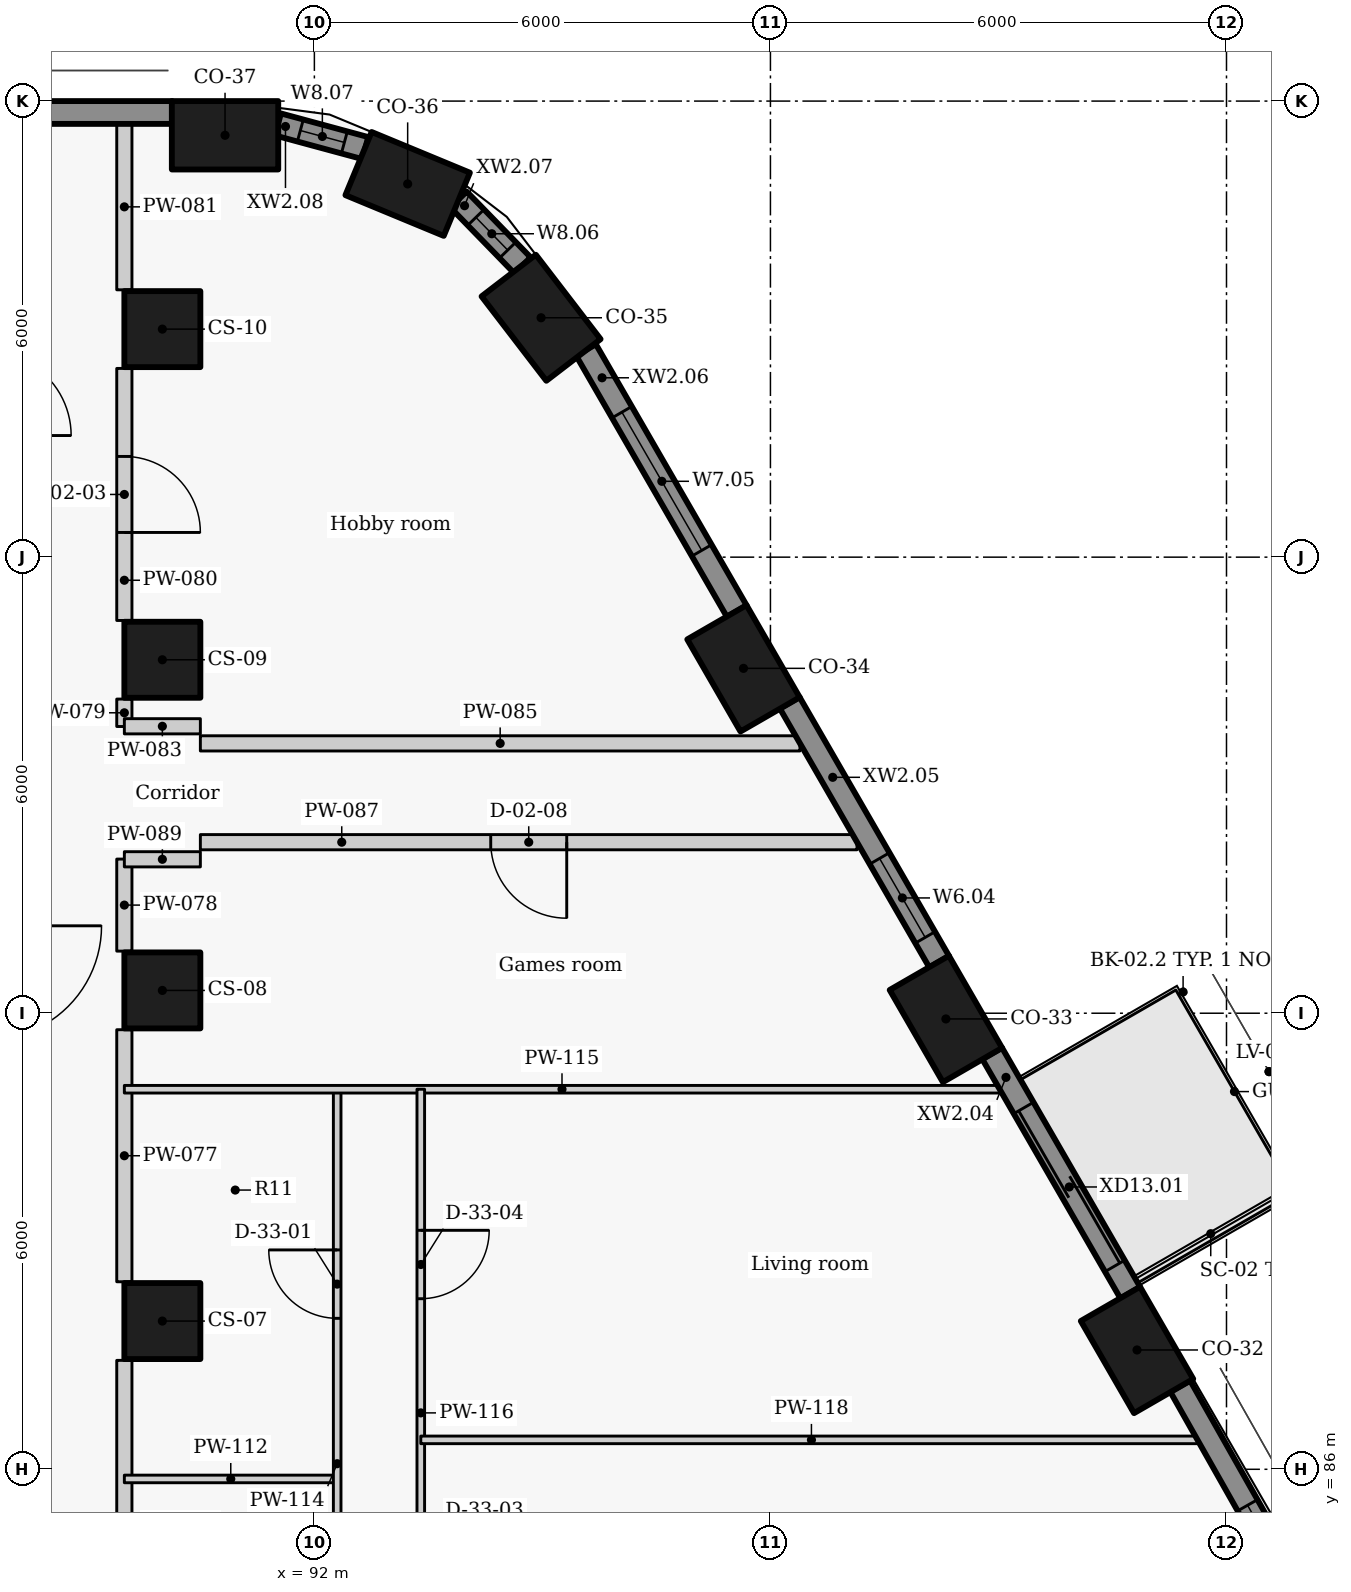
"""IFC4 building model, lengths in metres.
Left out: names, types, materials, properties, quantities, classifications, styles, units other than length and angle.
Written with IfcOpenShell. Run it as: python <this file> out.ifc"""

import sys

from ifc_helpers import new_model, si_unit, direction, frame, frame_2d, origin, origin_2d, place, context, subcontext, project, spatial, rectangle, extrude, element, fill, save


model = new_model("IFC4")
c1 = context("Model", 3, precision=1e-05, world=origin(), true_north=direction((0.0, 1.0)))
c2 = subcontext(c1, "Body", "Model", "MODEL_VIEW")
j1 = project(units=[si_unit("LENGTHUNIT", "METRE"), si_unit("PLANEANGLEUNIT", "RADIAN")], contexts=[c1])
p1 = place(None, origin())
s1 = spatial("IfcSite", under=j1, at=p1, CompositionType="ELEMENT")
p2 = place(p1, origin())
s2 = spatial("IfcBuilding", under=s1, at=p2, CompositionType="ELEMENT")
p3 = place(p2, frame((0.0, 0.0, 114.0)))
s3 = spatial("IfcBuildingStorey", under=s2, at=p3, CompositionType="ELEMENT", Elevation=114.0)
for number, where, z_axis, x_axis in (
    (1, (102.823, 87.57, 0.0), (0.0, 0.0, 1.0), (-0.5, 0.866, 0.0)),
    (2, (100.308, 91.925, 0.0), (0.0, 0.0, 1.0), (-0.5, 0.866, 0.0)),
    (3, (97.646, 96.537, 0.0), (0.0, 0.0, 1.0), (-0.5, 0.866, 0.0)),
    (4, (94.982, 101.149, 0.0), (0.0, 0.0, 1.0), (-0.609, 0.793, 0.0)),
    (5, (93.227, 102.91, 0.0), (0.0, 0.0, 1.0), (-0.924, 0.383, 0.0)),
    (6, (90.825, 103.55, 0.0), (0.0, 0.0, 1.0), (-1.0, 0.0, 0.0)),
):
    element("IfcColumn", number, at=place(p3, frame(where, z_axis=z_axis, x_axis=x_axis)), inside=s3, PredefinedType="COLUMN", context=c2, shape_type="SweptSolid", body=[
        extrude(rectangle(XDim=1.4, YDim=0.9, at=origin_2d()), origin(), (0.0, 0.0, 1.0), 3.3),
    ])
for number, where, z_axis, x_axis in (
    (7, (90.0, 87.95, 0.0), (0.0, 0.0, 1.0), (0.0, 1.0, 0.0)),
    (8, (90.0, 92.3, 0.0), (0.0, 0.0, 1.0), (0.0, 1.0, 0.0)),
    (9, (90.0, 96.65, 0.0), (0.0, 0.0, 1.0), (0.0, 1.0, 0.0)),
    (10, (90.0, 101.0, 0.0), (0.0, 0.0, 1.0), (0.0, 1.0, 0.0)),
):
    element("IfcColumn", number, at=place(p3, frame(where, z_axis=z_axis, x_axis=x_axis)), inside=s3, PredefinedType="COLUMN", context=c2, shape_type="SweptSolid", body=[
        extrude(rectangle(XDim=1.0, YDim=1.0, at=origin_2d()), origin(), (0.0, 0.0, 1.0), 3.3),
    ])
p4 = place(p3, frame((106.186, 82.153, 0.0), z_axis=(0.0, 0.0, 1.0), x_axis=(-0.492456858874, 0.870336855561, 0.0)))
e11 = element("IfcWall", 11, at=p4, inside=s3, PredefinedType="SOLIDWALL", context=c2, shape_type="SweptSolid", body=[
    extrude(rectangle(XDim=5.677, YDim=0.3, at=frame_2d((2.838, 0.0))), origin(), (0.0, 0.0, 1.0), 2.425),
])
p5 = place(p4, frame((2.376, 0.0, 0.9)))
e12 = element("IfcOpeningElement", 12, at=p5, cuts=e11, PredefinedType="OPENING", context=c2, shape_type="SweptSolid", body=[
    extrude(rectangle(XDim=1.5, YDim=1.1, at=frame_2d((0.75, 0.55))), frame((0.0, 0.16, 0.0), z_axis=(0.0, -1.0, 0.0), x_axis=(1.0, 0.0, 0.0)), (0.0, 0.0, 1.0), 0.32),
])
p6 = place(p3, frame((102.735, 88.323, 0.0), z_axis=(0.0, 0.0, 1.0), x_axis=(-0.500009139881, 0.866020126807, 0.0)))
e13 = element("IfcWall", 13, at=p6, inside=s3, PredefinedType="SOLIDWALL", context=c2, shape_type="SweptSolid", body=[
    extrude(rectangle(XDim=3.637, YDim=0.3, at=frame_2d((1.818, 0.0))), origin(), (0.0, 0.0, 1.0), 2.425),
])
p7 = place(p6, frame((0.407, 0.0, 0.0)))
e14 = element("IfcOpeningElement", 14, at=p7, cuts=e13, PredefinedType="OPENING", context=c2, shape_type="SweptSolid", body=[
    extrude(rectangle(XDim=2.4, YDim=2.0, at=frame_2d((1.2, 1.0))), frame((0.0, 0.16, 0.0), z_axis=(0.0, -1.0, 0.0), x_axis=(1.0, 0.0, 0.0)), (0.0, 0.0, 1.0), 0.32),
])
p8 = place(p3, frame((100.22, 92.677, 0.0), z_axis=(0.0, 0.0, 1.0), x_axis=(-0.499957037901, 0.866050206543, 0.0)))
e15 = element("IfcWall", 15, at=p8, inside=s3, PredefinedType="SOLIDWALL", context=c2, shape_type="SweptSolid", body=[
    extrude(rectangle(XDim=3.934, YDim=0.3, at=frame_2d((1.967, 0.0))), origin(), (0.0, 0.0, 1.0), 2.425),
])
p9 = place(p8, frame((0.369, 0.0, 0.9)))
e16 = element("IfcOpeningElement", 16, at=p9, cuts=e15, PredefinedType="OPENING", context=c2, shape_type="SweptSolid", body=[
    extrude(rectangle(XDim=1.2, YDim=1.1, at=frame_2d((0.6, 0.55))), frame((0.0, 0.16, 0.0), z_axis=(0.0, -1.0, 0.0), x_axis=(1.0, 0.0, 0.0)), (0.0, 0.0, 1.0), 0.32),
])
p10 = place(p3, frame((97.557, 97.29, 0.0), z_axis=(0.0, 0.0, 1.0), x_axis=(-0.500043828347, 0.866000097998, 0.0)))
e17 = element("IfcWall", 17, at=p10, inside=s3, PredefinedType="SOLIDWALL", context=c2, shape_type="SweptSolid", body=[
    extrude(rectangle(XDim=3.968, YDim=0.3, at=frame_2d((1.984, 0.0))), origin(), (0.0, 0.0, 1.0), 2.425),
])
p11 = place(p10, frame((0.922, 0.0, 0.9)))
e18 = element("IfcOpeningElement", 18, at=p11, cuts=e17, PredefinedType="OPENING", context=c2, shape_type="SweptSolid", body=[
    extrude(rectangle(XDim=2.1, YDim=1.1, at=frame_2d((1.05, 0.55))), frame((0.0, 0.16, 0.0), z_axis=(0.0, -1.0, 0.0), x_axis=(1.0, 0.0, 0.0)), (0.0, 0.0, 1.0), 0.32),
])
p12 = place(p3, frame((94.738, 101.839, 0.0), z_axis=(0.0, 0.0, 1.0), x_axis=(-0.697032216592, 0.717039809936, 0.0)))
e19 = element("IfcWall", 19, at=p12, inside=s3, PredefinedType="SOLIDWALL", context=c2, shape_type="SweptSolid", body=[
    extrude(rectangle(XDim=1.208, YDim=0.3, at=frame_2d((0.604, 0.0))), origin(), (0.0, 0.0, 1.0), 2.425),
])
p13 = place(p12, frame((0.279, 0.0, 0.9)))
e20 = element("IfcOpeningElement", 20, at=p13, cuts=e19, PredefinedType="OPENING", context=c2, shape_type="SweptSolid", body=[
    extrude(rectangle(XDim=0.6, YDim=1.1, at=frame_2d((0.3, 0.55))), frame((0.0, 0.16, 0.0), z_axis=(0.0, -1.0, 0.0), x_axis=(1.0, 0.0, 0.0)), (0.0, 0.0, 1.0), 0.32),
])
p14 = place(p3, frame((92.669, 103.382, 0.0), z_axis=(0.0, 0.0, 1.0), x_axis=(-0.965278131029, 0.261224290136, 0.0)))
e21 = element("IfcWall", 21, at=p14, inside=s3, PredefinedType="SOLIDWALL", context=c2, shape_type="SweptSolid", body=[
    extrude(rectangle(XDim=1.19, YDim=0.3, at=frame_2d((0.595, 0.0))), origin(), (0.0, 0.0, 1.0), 2.425),
])
p15 = place(p14, frame((0.285, 0.0, 0.9)))
e22 = element("IfcOpeningElement", 22, at=p15, cuts=e21, PredefinedType="OPENING", context=c2, shape_type="SweptSolid", body=[
    extrude(rectangle(XDim=0.6, YDim=1.1, at=frame_2d((0.3, 0.55))), frame((0.0, 0.16, 0.0), z_axis=(0.0, -1.0, 0.0), x_axis=(1.0, 0.0, 0.0)), (0.0, 0.0, 1.0), 0.32),
])
p16 = place(p3, frame((90.129, 103.85, 0.0), z_axis=(0.0, 0.0, 1.0), x_axis=(-1.0, 0.0, 0.0)))
e23 = element("IfcWall", 23, at=p16, inside=s3, PredefinedType="SOLIDWALL", context=c2, shape_type="SweptSolid", body=[
    extrude(rectangle(XDim=20.291, YDim=0.3, at=frame_2d((10.146, 0.0))), origin(), (0.0, 0.0, 1.0), 2.425),
])
p17 = place(p3, frame((89.5, 83.167, 0.0), z_axis=(0.0, 0.0, 1.0), x_axis=(0.0, 1.0, 0.0)))
e24 = element("IfcWall", 24, at=p17, inside=s3, PredefinedType="PARTITIONING", context=c2, shape_type="SweptSolid", body=[
    extrude(rectangle(XDim=4.266, YDim=0.2, at=frame_2d((2.133, 0.0))), origin(), (0.0, 0.0, 1.0), 3.025),
])
p18 = place(p3, frame((89.5, 88.467, 0.0), z_axis=(0.0, 0.0, 1.0), x_axis=(0.0, 1.0, 0.0)))
e25 = element("IfcWall", 25, at=p18, inside=s3, PredefinedType="PARTITIONING", context=c2, shape_type="SweptSolid", body=[
    extrude(rectangle(XDim=3.316, YDim=0.2, at=frame_2d((1.658, 0.0))), origin(), (0.0, 0.0, 1.0), 3.025),
])
p19 = place(p3, frame((89.5, 92.817, 0.0), z_axis=(0.0, 0.0, 1.0), x_axis=(0.0, 1.0, 0.0)))
e26 = element("IfcWall", 26, at=p19, inside=s3, PredefinedType="PARTITIONING", context=c2, shape_type="SweptSolid", body=[
    extrude(rectangle(XDim=1.211, YDim=0.2, at=frame_2d((0.605, 0.0))), origin(), (0.0, 0.0, 1.0), 3.025),
])
p20 = place(p3, frame((89.5, 95.772, 0.0), z_axis=(0.0, 0.0, 1.0), x_axis=(0.0, 1.0, 0.0)))
e27 = element("IfcWall", 27, at=p20, inside=s3, PredefinedType="PARTITIONING", context=c2, shape_type="SweptSolid", body=[
    extrude(rectangle(XDim=0.361, YDim=0.2, at=frame_2d((0.181, 0.0))), origin(), (0.0, 0.0, 1.0), 3.025),
])
p21 = place(p3, frame((89.5, 100.483, 0.0), z_axis=(0.0, 0.0, 1.0), x_axis=(0.0, -1.0, 0.0)))
e28 = element("IfcWall", 28, at=p21, inside=s3, PredefinedType="PARTITIONING", context=c2, shape_type="SweptSolid", body=[
    extrude(rectangle(XDim=3.316, YDim=0.2, at=frame_2d((1.658, 0.0))), origin(), (0.0, 0.0, 1.0), 3.025),
])
p22 = place(p21, frame((1.158, 0.0, 0.0)))
e29 = element("IfcOpeningElement", 29, at=p22, cuts=e28, PredefinedType="OPENING", context=c2, shape_type="SweptSolid", body=[
    extrude(rectangle(XDim=1.0, YDim=2.1, at=frame_2d((0.5, 1.05))), frame((0.0, 0.11, 0.0), z_axis=(0.0, -1.0, 0.0), x_axis=(1.0, 0.0, 0.0)), (0.0, 0.0, 1.0), 0.22),
])
p23 = place(p3, frame((89.5, 101.517, 0.0), z_axis=(0.0, 0.0, 1.0), x_axis=(0.0, 1.0, 0.0)))
e30 = element("IfcWall", 30, at=p23, inside=s3, PredefinedType="PARTITIONING", context=c2, shape_type="SweptSolid", body=[
    extrude(rectangle(XDim=2.183, YDim=0.2, at=frame_2d((1.091, 0.0))), origin(), (0.0, 0.0, 1.0), 3.025),
])
p24 = place(p3, frame((89.5, 95.775, 0.0), z_axis=(0.0, 0.0, 1.0), x_axis=(1.0, 0.0, 0.0)))
e31 = element("IfcWall", 31, at=p24, inside=s3, PredefinedType="PARTITIONING", context=c2, shape_type="SweptSolid", body=[
    extrude(rectangle(XDim=1.0, YDim=0.2, at=frame_2d((0.5, 0.0))), origin(), (0.0, 0.0, 1.0), 2.505),
])
p25 = place(p3, frame((90.5, 95.55, 0.0), z_axis=(0.0, 0.0, 1.0), x_axis=(1.0, 0.0, 0.0)))
e32 = element("IfcWall", 32, at=p25, inside=s3, PredefinedType="PARTITIONING", context=c2, shape_type="SweptSolid", body=[
    extrude(rectangle(XDim=7.889, YDim=0.2, at=frame_2d((3.944, 0.0))), origin(), (0.0, 0.0, 1.0), 2.405),
])
p26 = place(p3, frame((99.139, 94.25, 0.0), z_axis=(0.0, 0.0, 1.0), x_axis=(-1.0, 0.0, 0.0)))
e33 = element("IfcWall", 33, at=p26, inside=s3, PredefinedType="PARTITIONING", context=c2, shape_type="SweptSolid", body=[
    extrude(rectangle(XDim=8.639, YDim=0.2, at=frame_2d((4.32, 0.0))), origin(), (0.0, 0.0, 1.0), 2.405),
])
p27 = place(p26, frame((3.819, 0.0, 0.0)))
e34 = element("IfcOpeningElement", 34, at=p27, cuts=e33, PredefinedType="OPENING", context=c2, shape_type="SweptSolid", body=[
    extrude(rectangle(XDim=1.0, YDim=2.1, at=frame_2d((0.5, 1.05))), frame((0.0, 0.11, 0.0), z_axis=(0.0, -1.0, 0.0), x_axis=(1.0, 0.0, 0.0)), (0.0, 0.0, 1.0), 0.22),
])
p28 = place(p3, frame((89.5, 94.025, 0.0), z_axis=(0.0, 0.0, 1.0), x_axis=(1.0, 0.0, 0.0)))
e35 = element("IfcWall", 35, at=p28, inside=s3, PredefinedType="PARTITIONING", context=c2, shape_type="SweptSolid", body=[
    extrude(rectangle(XDim=1.0, YDim=0.2, at=frame_2d((0.5, 0.0))), origin(), (0.0, 0.0, 1.0), 2.505),
])
p29 = place(p3, frame((89.5, 85.873, 0.0), z_axis=(0.0, 0.0, 1.0), x_axis=(1.0, 0.0, 0.0)))
e36 = element("IfcWall", 36, at=p29, inside=s3, PredefinedType="PARTITIONING", context=c2, shape_type="SweptSolid", body=[
    extrude(rectangle(XDim=2.8, YDim=0.1, at=frame_2d((1.4, 0.0))), origin(), (0.0, 0.0, 1.0), 2.505),
])
p30 = place(p3, frame((92.3, 81.6, 0.0), z_axis=(0.0, 0.0, 1.0), x_axis=(0.0, 1.0, 0.0)))
e37 = element("IfcWall", 37, at=p30, inside=s3, PredefinedType="PARTITIONING", context=c2, shape_type="SweptSolid", body=[
    extrude(rectangle(XDim=9.4, YDim=0.1, at=frame_2d((4.7, 0.0))), origin(), (0.0, 0.0, 1.0), 3.025),
])
p31 = place(p30, frame((1.711, 0.0, 0.0)))
e38 = element("IfcOpeningElement", 38, at=p31, cuts=e37, PredefinedType="OPENING", context=c2, shape_type="SweptSolid", body=[
    extrude(rectangle(XDim=0.85, YDim=2.1, at=frame_2d((0.425, 1.05))), frame((0.0, 0.06, 0.0), z_axis=(0.0, -1.0, 0.0), x_axis=(1.0, 0.0, 0.0)), (0.0, 0.0, 1.0), 0.12),
])
p32 = place(p30, frame((6.386, 0.0, 0.0)))
e39 = element("IfcOpeningElement", 39, at=p32, cuts=e37, PredefinedType="OPENING", context=c2, shape_type="SweptSolid", body=[
    extrude(rectangle(XDim=0.9, YDim=2.1, at=frame_2d((0.45, 1.05))), frame((0.0, 0.06, 0.0), z_axis=(0.0, -1.0, 0.0), x_axis=(1.0, 0.0, 0.0)), (0.0, 0.0, 1.0), 0.12),
])
p33 = place(p3, frame((89.5, 91.0, 0.0), z_axis=(0.0, 0.0, 1.0), x_axis=(1.0, 0.0, 0.0)))
e40 = element("IfcWall", 40, at=p33, inside=s3, PredefinedType="PARTITIONING", context=c2, shape_type="SweptSolid", body=[
    extrude(rectangle(XDim=11.515, YDim=0.1, at=frame_2d((5.758, 0.0))), origin(), (0.0, 0.0, 1.0), 2.405),
])
p34 = place(p3, frame((93.4, 91.0, 0.0), z_axis=(0.0, 0.0, 1.0), x_axis=(0.0, -1.0, 0.0)))
e41 = element("IfcWall", 41, at=p34, inside=s3, PredefinedType="PARTITIONING", context=c2, shape_type="SweptSolid", body=[
    extrude(rectangle(XDim=11.0, YDim=0.1, at=frame_2d((5.5, 0.0))), origin(), (0.0, 0.0, 1.0), 3.025),
])
p35 = place(p34, frame((8.953, 0.0, 0.0)))
e42 = element("IfcOpeningElement", 42, at=p35, cuts=e41, PredefinedType="OPENING", context=c2, shape_type="SweptSolid", body=[
    extrude(rectangle(XDim=0.9, YDim=2.1, at=frame_2d((0.45, 1.05))), frame((0.0, 0.06, 0.0), z_axis=(0.0, -1.0, 0.0), x_axis=(1.0, 0.0, 0.0)), (0.0, 0.0, 1.0), 0.12),
])
p36 = place(p34, frame((5.76, 0.0, 0.0)))
e43 = element("IfcOpeningElement", 43, at=p36, cuts=e41, PredefinedType="OPENING", context=c2, shape_type="SweptSolid", body=[
    extrude(rectangle(XDim=0.9, YDim=2.1, at=frame_2d((0.45, 1.05))), frame((0.0, 0.06, 0.0), z_axis=(0.0, -1.0, 0.0), x_axis=(1.0, 0.0, 0.0)), (0.0, 0.0, 1.0), 0.12),
])
p37 = place(p34, frame((1.856, 0.0, 0.0)))
e44 = element("IfcOpeningElement", 44, at=p37, cuts=e41, PredefinedType="OPENING", context=c2, shape_type="SweptSolid", body=[
    extrude(rectangle(XDim=0.9, YDim=2.1, at=frame_2d((0.45, 1.05))), frame((0.0, 0.06, 0.0), z_axis=(0.0, -1.0, 0.0), x_axis=(1.0, 0.0, 0.0)), (0.0, 0.0, 1.0), 0.12),
])
p38 = place(p3, frame((93.4, 86.387, 0.0), z_axis=(0.0, 0.0, 1.0), x_axis=(1.0, 0.0, 0.0)))
e45 = element("IfcWall", 45, at=p38, inside=s3, PredefinedType="PARTITIONING", context=c2, shape_type="SweptSolid", body=[
    extrude(rectangle(XDim=10.279, YDim=0.1, at=frame_2d((5.139, 0.0))), origin(), (0.0, 0.0, 1.0), 2.405),
])
p39 = place(p5, origin())
e46 = element("IfcWindow", 46, at=p39, inside=s3, PartitioningType="SINGLE_PANEL", PredefinedType="WINDOW", context=c2, shape_type="SweptSolid", body=[
    extrude(rectangle(XDim=1.5, YDim=1.1, at=frame_2d((0.75, 0.55))), frame((0.0, 0.03, 0.0), z_axis=(0.0, -1.0, 0.0), x_axis=(1.0, 0.0, 0.0)), (0.0, 0.0, 1.0), 0.06),
])
fill(e12, e46)
p40 = place(p7, origin())
e47 = element("IfcDoor", 47, at=p40, inside=s3, OperationType="DOUBLE_DOOR_SLIDING", PredefinedType="DOOR", context=c2, shape_type="SweptSolid", body=[
    extrude(rectangle(XDim=2.4, YDim=2.0, at=frame_2d((1.2, 1.0))), frame((0.0, 0.025, 0.0), z_axis=(0.0, -1.0, 0.0), x_axis=(1.0, 0.0, 0.0)), (0.0, 0.0, 1.0), 0.05),
])
fill(e14, e47)
p41 = place(p9, origin())
e48 = element("IfcWindow", 48, at=p41, inside=s3, PartitioningType="SINGLE_PANEL", PredefinedType="WINDOW", context=c2, shape_type="SweptSolid", body=[
    extrude(rectangle(XDim=1.2, YDim=1.1, at=frame_2d((0.6, 0.55))), frame((0.0, 0.03, 0.0), z_axis=(0.0, -1.0, 0.0), x_axis=(1.0, 0.0, 0.0)), (0.0, 0.0, 1.0), 0.06),
])
fill(e16, e48)
p42 = place(p11, origin())
e49 = element("IfcWindow", 49, at=p42, inside=s3, PartitioningType="SINGLE_PANEL", PredefinedType="WINDOW", context=c2, shape_type="SweptSolid", body=[
    extrude(rectangle(XDim=2.1, YDim=1.1, at=frame_2d((1.05, 0.55))), frame((0.0, 0.03, 0.0), z_axis=(0.0, -1.0, 0.0), x_axis=(1.0, 0.0, 0.0)), (0.0, 0.0, 1.0), 0.06),
])
fill(e18, e49)
p43 = place(p13, origin())
e50 = element("IfcWindow", 50, at=p43, inside=s3, PartitioningType="SINGLE_PANEL", PredefinedType="WINDOW", context=c2, shape_type="SweptSolid", body=[
    extrude(rectangle(XDim=0.6, YDim=1.1, at=frame_2d((0.3, 0.55))), frame((0.0, 0.03, 0.0), z_axis=(0.0, -1.0, 0.0), x_axis=(1.0, 0.0, 0.0)), (0.0, 0.0, 1.0), 0.06),
])
fill(e20, e50)
p44 = place(p15, origin())
e51 = element("IfcWindow", 51, at=p44, inside=s3, PartitioningType="SINGLE_PANEL", PredefinedType="WINDOW", context=c2, shape_type="SweptSolid", body=[
    extrude(rectangle(XDim=0.6, YDim=1.1, at=frame_2d((0.3, 0.55))), frame((0.0, 0.03, 0.0), z_axis=(0.0, -1.0, 0.0), x_axis=(1.0, 0.0, 0.0)), (0.0, 0.0, 1.0), 0.06),
])
fill(e22, e51)
p45 = place(p32, origin())
e52 = element("IfcDoor", 52, at=p45, inside=s3, OperationType="SINGLE_SWING_RIGHT", PredefinedType="DOOR", context=c2, shape_type="SweptSolid", body=[
    extrude(rectangle(XDim=0.9, YDim=2.1, at=frame_2d((0.45, 1.05))), frame((0.0, 0.025, 0.0), z_axis=(0.0, -1.0, 0.0), x_axis=(1.0, 0.0, 0.0)), (0.0, 0.0, 1.0), 0.05),
])
fill(e39, e52)
p46 = place(p37, origin())
e53 = element("IfcDoor", 53, at=p46, inside=s3, OperationType="SINGLE_SWING_LEFT", PredefinedType="DOOR", context=c2, shape_type="SweptSolid", body=[
    extrude(rectangle(XDim=0.9, YDim=2.1, at=frame_2d((0.45, 1.05))), frame((0.0, 0.025, 0.0), z_axis=(0.0, -1.0, 0.0), x_axis=(1.0, 0.0, 0.0)), (0.0, 0.0, 1.0), 0.05),
])
fill(e44, e53)
p47 = place(p22, origin())
e54 = element("IfcDoor", 54, at=p47, inside=s3, OperationType="SINGLE_SWING_RIGHT", PredefinedType="DOOR", context=c2, shape_type="SweptSolid", body=[
    extrude(rectangle(XDim=1.0, YDim=2.1, at=frame_2d((0.5, 1.05))), frame((0.0, 0.025, 0.0), z_axis=(0.0, -1.0, 0.0), x_axis=(1.0, 0.0, 0.0)), (0.0, 0.0, 1.0), 0.05),
])
fill(e29, e54)
p48 = place(p27, origin())
e55 = element("IfcDoor", 55, at=p48, inside=s3, OperationType="SINGLE_SWING_LEFT", PredefinedType="DOOR", context=c2, shape_type="SweptSolid", body=[
    extrude(rectangle(XDim=1.0, YDim=2.1, at=frame_2d((0.5, 1.05))), frame((0.0, 0.025, 0.0), z_axis=(0.0, -1.0, 0.0), x_axis=(1.0, 0.0, 0.0)), (0.0, 0.0, 1.0), 0.05),
])
fill(e34, e55)
save(model, sys.argv[1])
